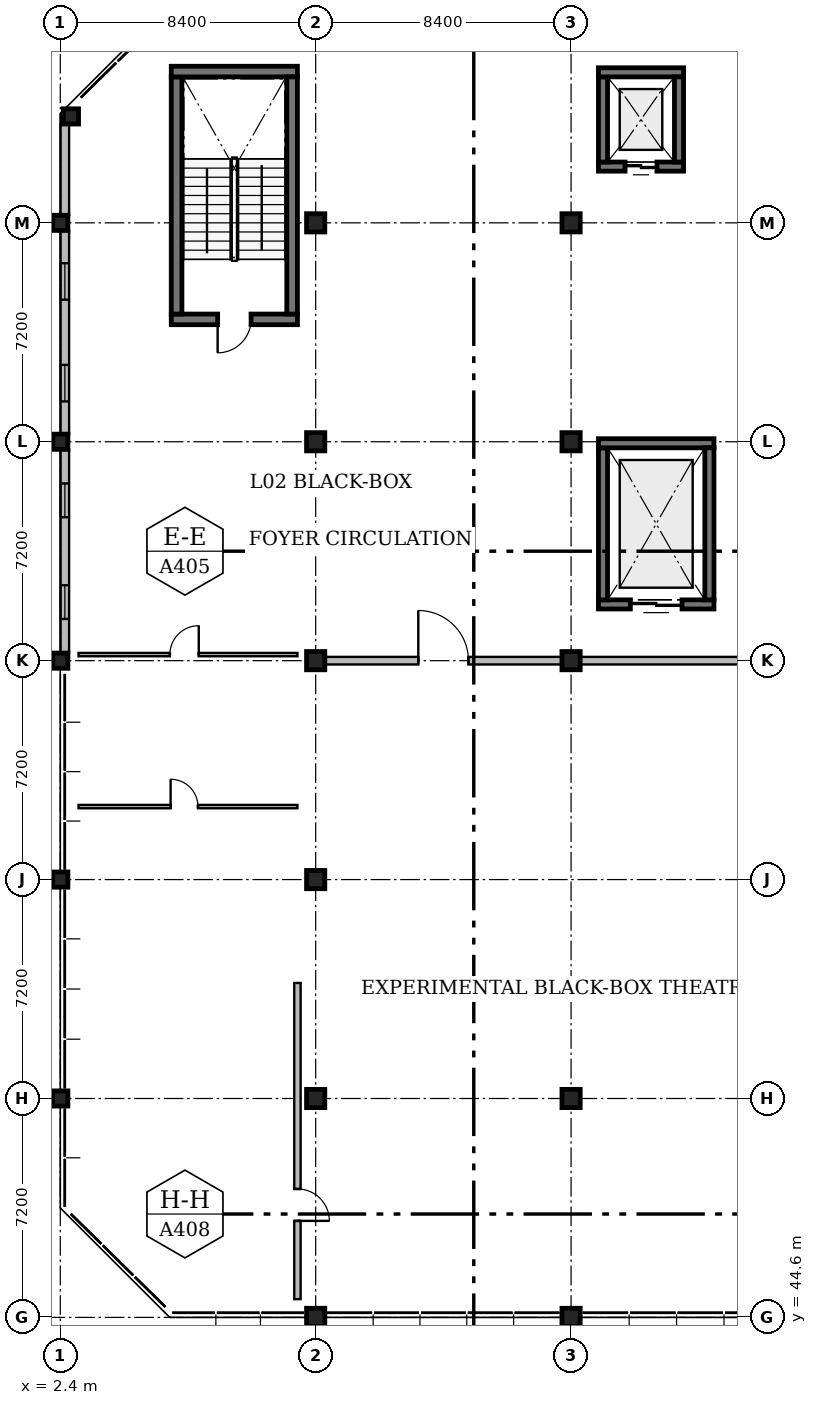
"""IFC4 building model, lengths in metres.
Left out: names, types, materials, properties, quantities, classifications, styles, units other than length and angle.
Written with IfcOpenShell. Run it as: python <this file> out.ifc"""

import sys

from ifc_helpers import new_model, si_unit, direction, frame, frame_2d, origin, origin_2d, place, context, subcontext, project, spatial, rectangle, extrude, element, fill, save


model = new_model("IFC4")
c1 = context("Model", 3, precision=1e-05, world=origin(), true_north=direction((0.0, 1.0)))
c2 = subcontext(c1, "Body", "Model", "MODEL_VIEW")
j1 = project(units=[si_unit("LENGTHUNIT", "METRE"), si_unit("PLANEANGLEUNIT", "RADIAN")], contexts=[c1])
p1 = place(None, origin())
s1 = spatial("IfcSite", under=j1, at=p1, CompositionType="ELEMENT")
p2 = place(p1, origin())
s2 = spatial("IfcBuilding", under=s1, at=p2, CompositionType="ELEMENT")
p3 = place(p2, frame((0.0, 0.0, 9.0)))
s3 = spatial("IfcBuildingStorey", under=s2, at=p3, CompositionType="ELEMENT", Elevation=9.0)
for number, where, z_axis, x_axis in (
    (1, (2.4, 51.8, 0.0), (0.0, 0.0, 1.0), (1.0, 0.0, 0.0)),
    (2, (2.4, 59.0, 0.0), (0.0, 0.0, 1.0), (1.0, 0.0, 0.0)),
    (3, (2.4, 66.2, 0.0), (0.0, 0.0, 1.0), (1.0, 0.0, 0.0)),
    (4, (2.4, 73.4, 0.0), (0.0, 0.0, 1.0), (1.0, 0.0, 0.0)),
    (5, (2.4, 80.6, 0.0), (0.0, 0.0, 1.0), (1.0, 0.0, 0.0)),
):
    element("IfcColumn", number, at=place(p3, frame(where, z_axis=z_axis, x_axis=x_axis)), inside=s3, PredefinedType="COLUMN", context=c2, shape_type="SweptSolid", body=[
        extrude(rectangle(XDim=0.5, YDim=0.5, at=origin_2d()), origin(), (0.0, 0.0, 1.0), 4.2),
    ])
for number, where, z_axis, x_axis in (
    (6, (10.8, 44.6, 0.0), (0.0, 0.0, 1.0), (1.0, 0.0, 0.0)),
    (7, (10.8, 51.8, 0.0), (0.0, 0.0, 1.0), (1.0, 0.0, 0.0)),
    (8, (10.8, 59.0, 0.0), (0.0, 0.0, 1.0), (1.0, 0.0, 0.0)),
    (9, (10.8, 66.2, 0.0), (0.0, 0.0, 1.0), (1.0, 0.0, 0.0)),
    (10, (10.8, 73.4, 0.0), (0.0, 0.0, 1.0), (1.0, 0.0, 0.0)),
    (11, (10.8, 80.6, 0.0), (0.0, 0.0, 1.0), (1.0, 0.0, 0.0)),
    (12, (19.2, 44.6, 0.0), (0.0, 0.0, 1.0), (1.0, 0.0, 0.0)),
    (13, (19.2, 51.8, 0.0), (0.0, 0.0, 1.0), (1.0, 0.0, 0.0)),
    (14, (19.2, 66.2, 0.0), (0.0, 0.0, 1.0), (1.0, 0.0, 0.0)),
    (15, (19.2, 73.4, 0.0), (0.0, 0.0, 1.0), (1.0, 0.0, 0.0)),
    (16, (19.2, 80.6, 0.0), (0.0, 0.0, 1.0), (1.0, 0.0, 0.0)),
):
    element("IfcColumn", number, at=place(p3, frame(where, z_axis=z_axis, x_axis=x_axis)), inside=s3, PredefinedType="COLUMN", context=c2, shape_type="SweptSolid", body=[
        extrude(rectangle(XDim=0.6, YDim=0.6, at=origin_2d()), origin(), (0.0, 0.0, 1.0), 4.2),
    ])
p4 = place(p3, frame((2.75, 84.1, 0.0), z_axis=(0.0, 0.0, 1.0), x_axis=(1.0, 0.0, 0.0)))
e17 = element("IfcColumn", 17, at=p4, inside=s3, PredefinedType="COLUMN", context=c2, shape_type="SweptSolid", body=[
    extrude(rectangle(XDim=0.5, YDim=0.5, at=origin_2d()), origin(), (0.0, 0.0, 1.0), 4.2),
])
p5 = place(p3, frame((10.2, 77.425, 0.0), z_axis=(0.0, 0.0, 1.0), x_axis=(-1.0, 0.0, 0.0)))
e18 = element("IfcWall", 18, at=p5, inside=s3, PredefinedType="SOLIDWALL", context=c2, shape_type="SweptSolid", body=[
    extrude(rectangle(XDim=4.15, YDim=0.35, at=frame_2d((2.075, 0.0))), origin(), (0.0, 0.0, 1.0), 4.2),
])
p6 = place(p5, frame((1.525, 0.0, 0.0)))
e19 = element("IfcOpeningElement", 19, at=p6, cuts=e18, PredefinedType="OPENING", context=c2, shape_type="SweptSolid", body=[
    extrude(rectangle(XDim=1.1, YDim=2.15, at=frame_2d((0.55, 1.075))), frame((0.0, 0.195, 0.0), z_axis=(0.0, -1.0, 0.0), x_axis=(1.0, 0.0, 0.0)), (0.0, 0.0, 1.0), 0.39),
])
p7 = place(p3, frame((6.225, 77.6, 0.0), z_axis=(0.0, 0.0, 1.0), x_axis=(0.0, 1.0, 0.0)))
e20 = element("IfcWall", 20, at=p7, inside=s3, PredefinedType="SOLIDWALL", context=c2, shape_type="SweptSolid", body=[
    extrude(rectangle(XDim=7.8, YDim=0.35, at=frame_2d((3.9, 0.0))), origin(), (0.0, 0.0, 1.0), 4.2),
])
p8 = place(p3, frame((6.05, 85.575, 0.0), z_axis=(0.0, 0.0, 1.0), x_axis=(1.0, 0.0, 0.0)))
e21 = element("IfcWall", 21, at=p8, inside=s3, PredefinedType="SOLIDWALL", context=c2, shape_type="SweptSolid", body=[
    extrude(rectangle(XDim=4.15, YDim=0.35, at=frame_2d((2.075, 0.0))), origin(), (0.0, 0.0, 1.0), 4.2),
])
p9 = place(p3, frame((10.025, 85.4, 0.0), z_axis=(0.0, 0.0, 1.0), x_axis=(0.0, -1.0, 0.0)))
e22 = element("IfcWall", 22, at=p9, inside=s3, PredefinedType="SOLIDWALL", context=c2, shape_type="SweptSolid", body=[
    extrude(rectangle(XDim=7.8, YDim=0.35, at=frame_2d((3.9, 0.0))), origin(), (0.0, 0.0, 1.0), 4.2),
])
p10 = place(p3, frame((22.9, 82.45, 0.0), z_axis=(0.0, 0.0, 1.0), x_axis=(-1.0, 0.0, 0.0)))
e23 = element("IfcWall", 23, at=p10, inside=s3, PredefinedType="SOLIDWALL", context=c2, shape_type="SweptSolid", body=[
    extrude(rectangle(XDim=2.8, YDim=0.3, at=frame_2d((1.4, 0.0))), origin(), (0.0, 0.0, 1.0), 4.2),
])
p11 = place(p10, frame((0.875, 0.0, 0.0)))
e24 = element("IfcOpeningElement", 24, at=p11, cuts=e23, PredefinedType="OPENING", context=c2, shape_type="SweptSolid", body=[
    extrude(rectangle(XDim=1.05, YDim=2.15, at=frame_2d((0.525, 1.075))), frame((0.0, 0.17, 0.0), z_axis=(0.0, -1.0, 0.0), x_axis=(1.0, 0.0, 0.0)), (0.0, 0.0, 1.0), 0.34),
])
for number, where, z_axis, x_axis in (
    (25, (20.25, 82.6, 0.0), (0.0, 0.0, 1.0), (0.0, 1.0, 0.0)),
    (26, (20.1, 85.55, 0.0), (0.0, 0.0, 1.0), (1.0, 0.0, 0.0)),
    (27, (22.75, 85.4, 0.0), (0.0, 0.0, 1.0), (0.0, -1.0, 0.0)),
):
    element("IfcWall", number, at=place(p3, frame(where, z_axis=z_axis, x_axis=x_axis)), inside=s3, PredefinedType="SOLIDWALL", context=c2, shape_type="SweptSolid", body=[
        extrude(rectangle(XDim=2.8, YDim=0.3, at=frame_2d((1.4, 0.0))), origin(), (0.0, 0.0, 1.0), 4.2),
    ])
p12 = place(p3, frame((23.9, 68.05, 0.0), z_axis=(0.0, 0.0, 1.0), x_axis=(-1.0, 0.0, 0.0)))
e28 = element("IfcWall", 28, at=p12, inside=s3, PredefinedType="SOLIDWALL", context=c2, shape_type="SweptSolid", body=[
    extrude(rectangle(XDim=3.8, YDim=0.3, at=frame_2d((1.9, 0.0))), origin(), (0.0, 0.0, 1.0), 4.2),
])
p13 = place(p12, frame((1.05, 0.0, 0.0)))
e29 = element("IfcOpeningElement", 29, at=p13, cuts=e28, PredefinedType="OPENING", context=c2, shape_type="SweptSolid", body=[
    extrude(rectangle(XDim=1.7, YDim=2.4, at=frame_2d((0.85, 1.2))), frame((0.0, 0.17, 0.0), z_axis=(0.0, -1.0, 0.0), x_axis=(1.0, 0.0, 0.0)), (0.0, 0.0, 1.0), 0.34),
])
p14 = place(p3, frame((20.25, 68.2, 0.0), z_axis=(0.0, 0.0, 1.0), x_axis=(0.0, 1.0, 0.0)))
e30 = element("IfcWall", 30, at=p14, inside=s3, PredefinedType="SOLIDWALL", context=c2, shape_type="SweptSolid", body=[
    extrude(rectangle(XDim=5.0, YDim=0.3, at=frame_2d((2.5, 0.0))), origin(), (0.0, 0.0, 1.0), 4.2),
])
p15 = place(p3, frame((20.1, 73.35, 0.0), z_axis=(0.0, 0.0, 1.0), x_axis=(1.0, 0.0, 0.0)))
e31 = element("IfcWall", 31, at=p15, inside=s3, PredefinedType="SOLIDWALL", context=c2, shape_type="SweptSolid", body=[
    extrude(rectangle(XDim=3.8, YDim=0.3, at=frame_2d((1.9, 0.0))), origin(), (0.0, 0.0, 1.0), 4.2),
])
p16 = place(p3, frame((23.75, 73.2, 0.0), z_axis=(0.0, 0.0, 1.0), x_axis=(0.0, -1.0, 0.0)))
e32 = element("IfcWall", 32, at=p16, inside=s3, PredefinedType="SOLIDWALL", context=c2, shape_type="SweptSolid", body=[
    extrude(rectangle(XDim=5.0, YDim=0.3, at=frame_2d((2.5, 0.0))), origin(), (0.0, 0.0, 1.0), 4.2),
])
p17 = place(p3, frame((2.55, 66.455, 0.0), z_axis=(0.0, 0.0, 1.0), x_axis=(0.0, 1.0, 0.0)))
e33 = element("IfcWall", 33, at=p17, inside=s3, PredefinedType="SOLIDWALL", context=c2, shape_type="SweptSolid", body=[
    extrude(rectangle(XDim=6.69, YDim=0.28, at=frame_2d((3.345, 0.0))), origin(), (0.0, 0.0, 1.0), 3.663),
])
p18 = place(p17, frame((1.117, 0.0, 0.95)))
e34 = element("IfcOpeningElement", 34, at=p18, cuts=e33, PredefinedType="OPENING", context=c2, shape_type="SweptSolid", body=[
    extrude(rectangle(XDim=1.11, YDim=1.85, at=frame_2d((0.555, 0.925))), frame((0.0, 0.16, 0.0), z_axis=(0.0, -1.0, 0.0), x_axis=(1.0, 0.0, 0.0)), (0.0, 0.0, 1.0), 0.32),
])
p19 = place(p17, frame((4.462, 0.0, 0.95)))
e35 = element("IfcOpeningElement", 35, at=p19, cuts=e33, PredefinedType="OPENING", context=c2, shape_type="SweptSolid", body=[
    extrude(rectangle(XDim=1.11, YDim=1.85, at=frame_2d((0.555, 0.925))), frame((0.0, 0.16, 0.0), z_axis=(0.0, -1.0, 0.0), x_axis=(1.0, 0.0, 0.0)), (0.0, 0.0, 1.0), 0.32),
])
p20 = place(p3, frame((2.55, 73.655, 0.0), z_axis=(0.0, 0.0, 1.0), x_axis=(0.0, 1.0, 0.0)))
e36 = element("IfcWall", 36, at=p20, inside=s3, PredefinedType="SOLIDWALL", context=c2, shape_type="SweptSolid", body=[
    extrude(rectangle(XDim=6.69, YDim=0.28, at=frame_2d((3.345, 0.0))), origin(), (0.0, 0.0, 1.0), 3.663),
])
p21 = place(p20, frame((1.073, 0.0, 0.95)))
e37 = element("IfcOpeningElement", 37, at=p21, cuts=e36, PredefinedType="OPENING", context=c2, shape_type="SweptSolid", body=[
    extrude(rectangle(XDim=1.2, YDim=2.05, at=frame_2d((0.6, 1.025))), frame((0.0, 0.16, 0.0), z_axis=(0.0, -1.0, 0.0), x_axis=(1.0, 0.0, 0.0)), (0.0, 0.0, 1.0), 0.32),
])
p22 = place(p20, frame((4.417, 0.0, 0.95)))
e38 = element("IfcOpeningElement", 38, at=p22, cuts=e36, PredefinedType="OPENING", context=c2, shape_type="SweptSolid", body=[
    extrude(rectangle(XDim=1.2, YDim=2.05, at=frame_2d((0.6, 1.025))), frame((0.0, 0.16, 0.0), z_axis=(0.0, -1.0, 0.0), x_axis=(1.0, 0.0, 0.0)), (0.0, 0.0, 1.0), 0.32),
])
p23 = place(p3, frame((2.55, 80.855, 0.0), z_axis=(0.0, 0.0, 1.0), x_axis=(0.0, 1.0, 0.0)))
e39 = element("IfcWall", 39, at=p23, inside=s3, PredefinedType="SOLIDWALL", context=c2, shape_type="SweptSolid", body=[
    extrude(rectangle(XDim=2.99, YDim=0.28, at=frame_2d((1.495, 0.0))), origin(), (0.0, 0.0, 1.0), 3.96),
])
p24 = place(p3, frame((11.12, 66.2, 0.0), z_axis=(0.0, 0.0, 1.0), x_axis=(1.0, 0.0, 0.0)))
e40 = element("IfcWall", 40, at=p24, inside=s3, PredefinedType="PARTITIONING", context=c2, shape_type="SweptSolid", body=[
    extrude(rectangle(XDim=7.76, YDim=0.25, at=frame_2d((3.88, 0.0))), origin(), (0.0, 0.0, 1.0), 3.52),
])
p25 = place(p24, frame((3.055, 0.0, 0.0)))
e41 = element("IfcOpeningElement", 41, at=p25, cuts=e40, PredefinedType="OPENING", context=c2, shape_type="SweptSolid", body=[
    extrude(rectangle(XDim=1.65, YDim=2.25, at=frame_2d((0.825, 1.125))), frame((0.0, 0.145, 0.0), z_axis=(0.0, -1.0, 0.0), x_axis=(1.0, 0.0, 0.0)), (0.0, 0.0, 1.0), 0.29),
])
p26 = place(p3, frame((19.52, 66.2, 0.0), z_axis=(0.0, 0.0, 1.0), x_axis=(1.0, 0.0, 0.0)))
e42 = element("IfcWall", 42, at=p26, inside=s3, PredefinedType="PARTITIONING", context=c2, shape_type="SweptSolid", body=[
    extrude(rectangle(XDim=7.48, YDim=0.25, at=frame_2d((3.74, 0.0))), origin(), (0.0, 0.0, 1.0), 3.95),
])
p27 = place(p3, frame((10.2, 55.6, 0.0), z_axis=(0.0, 0.0, 1.0), x_axis=(0.0, -1.0, 0.0)))
e43 = element("IfcWall", 43, at=p27, inside=s3, PredefinedType="PARTITIONING", context=c2, shape_type="SweptSolid", body=[
    extrude(rectangle(XDim=10.4, YDim=0.21, at=frame_2d((5.2, 0.0))), origin(), (0.0, 0.0, 1.0), 3.97),
])
p28 = place(p27, frame((6.776, 0.0, 0.0)))
e44 = element("IfcOpeningElement", 44, at=p28, cuts=e43, PredefinedType="OPENING", context=c2, shape_type="SweptSolid", body=[
    extrude(rectangle(XDim=1.05, YDim=2.15, at=frame_2d((0.525, 1.075))), frame((0.0, 0.125, 0.0), z_axis=(0.0, -1.0, 0.0), x_axis=(1.0, 0.0, 0.0)), (0.0, 0.0, 1.0), 0.25),
])
p29 = place(p3, frame((3.0, 61.4, 0.0), z_axis=(0.0, 0.0, 1.0), x_axis=(1.0, 0.0, 0.0)))
e45 = element("IfcWall", 45, at=p29, inside=s3, PredefinedType="PARTITIONING", context=c2, shape_type="SweptSolid", body=[
    extrude(rectangle(XDim=7.2, YDim=0.11, at=frame_2d((3.6, 0.0))), origin(), (0.0, 0.0, 1.0), 3.95),
])
p30 = place(p29, frame((3.028, 0.0, 0.0)))
e46 = element("IfcOpeningElement", 46, at=p30, cuts=e45, PredefinedType="OPENING", context=c2, shape_type="SweptSolid", body=[
    extrude(rectangle(XDim=0.9, YDim=2.15, at=frame_2d((0.45, 1.075))), frame((0.0, 0.075, 0.0), z_axis=(0.0, -1.0, 0.0), x_axis=(1.0, 0.0, 0.0)), (0.0, 0.0, 1.0), 0.15),
])
p31 = place(p3, frame((3.0, 66.4, 0.0), z_axis=(0.0, 0.0, 1.0), x_axis=(1.0, 0.0, 0.0)))
e47 = element("IfcWall", 47, at=p31, inside=s3, PredefinedType="PARTITIONING", context=c2, shape_type="SweptSolid", body=[
    extrude(rectangle(XDim=7.2, YDim=0.11, at=frame_2d((3.6, 0.0))), origin(), (0.0, 0.0, 1.0), 3.52),
])
p32 = place(p31, frame((3.004, 0.0, 0.0)))
e48 = element("IfcOpeningElement", 48, at=p32, cuts=e47, PredefinedType="OPENING", context=c2, shape_type="SweptSolid", body=[
    extrude(rectangle(XDim=0.95, YDim=2.1, at=frame_2d((0.475, 1.05))), frame((0.0, 0.075, 0.0), z_axis=(0.0, -1.0, 0.0), x_axis=(1.0, 0.0, 0.0)), (0.0, 0.0, 1.0), 0.15),
])
p33 = place(p6, origin())
e49 = element("IfcDoor", 49, at=p33, inside=s3, OperationType="SINGLE_SWING_RIGHT", PredefinedType="DOOR", context=c2, shape_type="SweptSolid", body=[
    extrude(rectangle(XDim=1.1, YDim=2.15, at=frame_2d((0.55, 1.075))), frame((0.0, 0.025, 0.0), z_axis=(0.0, -1.0, 0.0), x_axis=(1.0, 0.0, 0.0)), (0.0, 0.0, 1.0), 0.05),
])
fill(e19, e49)
p34 = place(p11, origin())
e50 = element("IfcDoor", 50, at=p34, inside=s3, OperationType="DOUBLE_DOOR_SLIDING", PredefinedType="DOOR", context=c2, shape_type="SweptSolid", body=[
    extrude(rectangle(XDim=1.05, YDim=2.15, at=frame_2d((0.525, 1.075))), frame((0.0, 0.025, 0.0), z_axis=(0.0, -1.0, 0.0), x_axis=(1.0, 0.0, 0.0)), (0.0, 0.0, 1.0), 0.05),
])
fill(e24, e50)
p35 = place(p13, origin())
e51 = element("IfcDoor", 51, at=p35, inside=s3, OperationType="DOUBLE_DOOR_SLIDING", PredefinedType="DOOR", context=c2, shape_type="SweptSolid", body=[
    extrude(rectangle(XDim=1.7, YDim=2.4, at=frame_2d((0.85, 1.2))), frame((0.0, 0.025, 0.0), z_axis=(0.0, -1.0, 0.0), x_axis=(1.0, 0.0, 0.0)), (0.0, 0.0, 1.0), 0.05),
])
fill(e29, e51)
p36 = place(p18, origin())
e52 = element("IfcWindow", 52, at=p36, inside=s3, PartitioningType="SINGLE_PANEL", PredefinedType="WINDOW", context=c2, shape_type="SweptSolid", body=[
    extrude(rectangle(XDim=1.11, YDim=1.85, at=frame_2d((0.555, 0.925))), frame((0.0, 0.03, 0.0), z_axis=(0.0, -1.0, 0.0), x_axis=(1.0, 0.0, 0.0)), (0.0, 0.0, 1.0), 0.06),
])
fill(e34, e52)
p37 = place(p19, origin())
e53 = element("IfcWindow", 53, at=p37, inside=s3, PartitioningType="SINGLE_PANEL", PredefinedType="WINDOW", context=c2, shape_type="SweptSolid", body=[
    extrude(rectangle(XDim=1.11, YDim=1.85, at=frame_2d((0.555, 0.925))), frame((0.0, 0.03, 0.0), z_axis=(0.0, -1.0, 0.0), x_axis=(1.0, 0.0, 0.0)), (0.0, 0.0, 1.0), 0.06),
])
fill(e35, e53)
p38 = place(p21, origin())
e54 = element("IfcWindow", 54, at=p38, inside=s3, PartitioningType="SINGLE_PANEL", PredefinedType="WINDOW", context=c2, shape_type="SweptSolid", body=[
    extrude(rectangle(XDim=1.2, YDim=2.05, at=frame_2d((0.6, 1.025))), frame((0.0, 0.03, 0.0), z_axis=(0.0, -1.0, 0.0), x_axis=(1.0, 0.0, 0.0)), (0.0, 0.0, 1.0), 0.06),
])
fill(e37, e54)
p39 = place(p22, origin())
e55 = element("IfcWindow", 55, at=p39, inside=s3, PartitioningType="SINGLE_PANEL", PredefinedType="WINDOW", context=c2, shape_type="SweptSolid", body=[
    extrude(rectangle(XDim=1.2, YDim=2.05, at=frame_2d((0.6, 1.025))), frame((0.0, 0.03, 0.0), z_axis=(0.0, -1.0, 0.0), x_axis=(1.0, 0.0, 0.0)), (0.0, 0.0, 1.0), 0.06),
])
fill(e38, e55)
p40 = place(p25, origin())
e56 = element("IfcDoor", 56, at=p40, inside=s3, OperationType="DOUBLE_DOOR_SINGLE_SWING", PredefinedType="DOOR", context=c2, shape_type="SweptSolid", body=[
    extrude(rectangle(XDim=1.65, YDim=2.25, at=frame_2d((0.825, 1.125))), frame((0.0, 0.025, 0.0), z_axis=(0.0, -1.0, 0.0), x_axis=(1.0, 0.0, 0.0)), (0.0, 0.0, 1.0), 0.05),
])
fill(e41, e56)
p41 = place(p28, origin())
e57 = element("IfcDoor", 57, at=p41, inside=s3, OperationType="SINGLE_SWING_RIGHT", PredefinedType="DOOR", context=c2, shape_type="SweptSolid", body=[
    extrude(rectangle(XDim=1.05, YDim=2.15, at=frame_2d((0.525, 1.075))), frame((0.0, 0.025, 0.0), z_axis=(0.0, -1.0, 0.0), x_axis=(1.0, 0.0, 0.0)), (0.0, 0.0, 1.0), 0.05),
])
fill(e44, e57)
p42 = place(p30, origin())
e58 = element("IfcDoor", 58, at=p42, inside=s3, OperationType="SINGLE_SWING_LEFT", PredefinedType="DOOR", context=c2, shape_type="SweptSolid", body=[
    extrude(rectangle(XDim=0.9, YDim=2.15, at=frame_2d((0.45, 1.075))), frame((0.0, 0.025, 0.0), z_axis=(0.0, -1.0, 0.0), x_axis=(1.0, 0.0, 0.0)), (0.0, 0.0, 1.0), 0.05),
])
fill(e46, e58)
p43 = place(p32, origin())
e59 = element("IfcDoor", 59, at=p43, inside=s3, OperationType="SINGLE_SWING_RIGHT", PredefinedType="DOOR", context=c2, shape_type="SweptSolid", body=[
    extrude(rectangle(XDim=0.95, YDim=2.1, at=frame_2d((0.475, 1.05))), frame((0.0, 0.025, 0.0), z_axis=(0.0, -1.0, 0.0), x_axis=(1.0, 0.0, 0.0)), (0.0, 0.0, 1.0), 0.05),
])
fill(e48, e59)
save(model, sys.argv[1])
